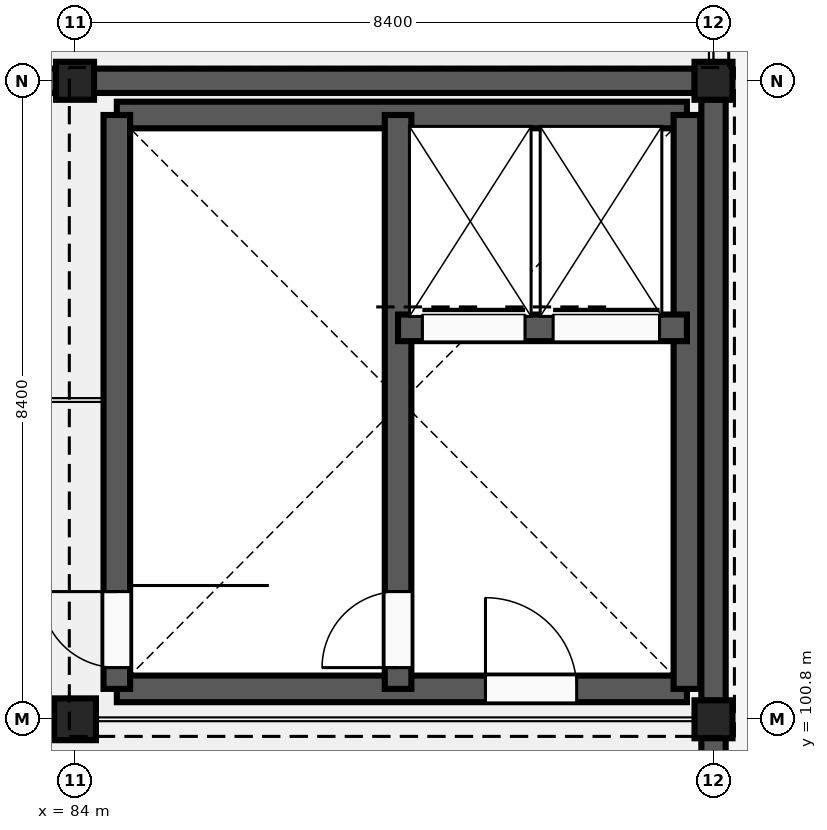
"""IFC4 building model, lengths in metres.
Left out: names, types, materials, properties, quantities, classifications, styles, units other than length and angle.
Written with IfcOpenShell. Run it as: python <this file> out.ifc"""

import sys

from ifc_helpers import new_model, si_unit, direction, frame, frame_2d, origin, origin_2d, place, context, subcontext, project, spatial, rectangle, extrude, element, fill, save


model = new_model("IFC4")
c1 = context("Model", 3, precision=1e-05, world=origin(), true_north=direction((0.0, 1.0)))
c2 = subcontext(c1, "Body", "Model", "MODEL_VIEW")
j1 = project(units=[si_unit("LENGTHUNIT", "METRE"), si_unit("PLANEANGLEUNIT", "RADIAN")], contexts=[c1])
p1 = place(None, origin())
s1 = spatial("IfcSite", under=j1, at=p1, CompositionType="ELEMENT")
p2 = place(p1, origin())
s2 = spatial("IfcBuilding", under=s1, at=p2, CompositionType="ELEMENT")
p3 = place(p2, frame((0.0, 0.0, 33.0)))
s3 = spatial("IfcBuildingStorey", under=s2, at=p3, CompositionType="ELEMENT", Elevation=33.0)
p4 = place(p3, frame((84.0, 100.8, 0.0), z_axis=(0.0, 0.0, 1.0), x_axis=(1.0, 0.0, 0.0)))
e1 = element("IfcColumn", 1, at=p4, inside=s3, PredefinedType="COLUMN", context=c2, shape_type="SweptSolid", body=[
    extrude(rectangle(XDim=0.55, YDim=0.55, at=origin_2d()), origin(), (0.0, 0.0, 1.0), 3.6),
])
for number, where, z_axis, x_axis in (
    (2, (84.0, 109.2, 0.0), (0.0, 0.0, 1.0), (1.0, 0.0, 0.0)),
    (3, (92.4, 100.8, 0.0), (0.0, 0.0, 1.0), (1.0, 0.0, 0.0)),
    (4, (92.4, 109.2, 0.0), (0.0, 0.0, 1.0), (1.0, 0.0, 0.0)),
):
    element("IfcColumn", number, at=place(p3, frame(where, z_axis=z_axis, x_axis=x_axis)), inside=s3, PredefinedType="COLUMN", context=c2, shape_type="SweptSolid", body=[
        extrude(rectangle(XDim=0.5, YDim=0.5, at=origin_2d()), origin(), (0.0, 0.0, 1.0), 3.6),
    ])
p5 = place(p3, frame((75.845, 109.2, 0.0), z_axis=(0.0, 0.0, 1.0), x_axis=(1.0, 0.0, 0.0)))
e5 = element("IfcWall", 5, at=p5, inside=s3, PredefinedType="SOLIDWALL", context=c2, shape_type="SweptSolid", body=[
    extrude(rectangle(XDim=7.91, YDim=0.32, at=frame_2d((3.955, 0.0))), origin(), (0.0, 0.0, 1.0), 2.9),
])
p6 = place(p5, frame((3.145, 0.0, 1.15)))
e6 = element("IfcOpeningElement", 6, at=p6, cuts=e5, PredefinedType="OPENING", context=c2, shape_type="SweptSolid", body=[
    extrude(rectangle(XDim=1.62, YDim=0.95, at=frame_2d((0.81, 0.475))), frame((0.0, 0.17, 0.0), z_axis=(0.0, -1.0, 0.0), x_axis=(1.0, 0.0, 0.0)), (0.0, 0.0, 1.0), 0.34),
])
p7 = place(p3, frame((92.4, 100.555, 0.0), z_axis=(0.0, 0.0, 1.0), x_axis=(0.0, -1.0, 0.0)))
e7 = element("IfcWall", 7, at=p7, inside=s3, PredefinedType="SOLIDWALL", context=c2, shape_type="SweptSolid", body=[
    extrude(rectangle(XDim=7.91, YDim=0.32, at=frame_2d((3.955, 0.0))), origin(), (0.0, 0.0, 1.0), 2.9),
])
p8 = place(p7, frame((2.055, 0.0, 0.0)))
e8 = element("IfcOpeningElement", 8, at=p8, cuts=e7, PredefinedType="OPENING", context=c2, shape_type="SweptSolid", body=[
    extrude(rectangle(XDim=1.8, YDim=2.25, at=frame_2d((0.9, 1.125))), frame((0.0, 0.17, 0.0), z_axis=(0.0, -1.0, 0.0), x_axis=(1.0, 0.0, 0.0)), (0.0, 0.0, 1.0), 0.34),
])
p9 = place(p3, frame((84.245, 109.2, 0.0), z_axis=(0.0, 0.0, 1.0), x_axis=(1.0, 0.0, 0.0)))
e9 = element("IfcWall", 9, at=p9, inside=s3, PredefinedType="SOLIDWALL", context=c2, shape_type="SweptSolid", body=[
    extrude(rectangle(XDim=7.91, YDim=0.32, at=frame_2d((3.955, 0.0))), origin(), (0.0, 0.0, 1.0), 2.9),
])
p10 = place(p3, frame((92.4, 108.955, 0.0), z_axis=(0.0, 0.0, 1.0), x_axis=(0.0, -1.0, 0.0)))
e10 = element("IfcWall", 10, at=p10, inside=s3, PredefinedType="SOLIDWALL", context=c2, shape_type="SweptSolid", body=[
    extrude(rectangle(XDim=7.91, YDim=0.32, at=frame_2d((3.955, 0.0))), origin(), (0.0, 0.0, 1.0), 2.9),
])
p11 = place(p3, frame((84.55, 101.2, 0.0), z_axis=(0.0, 0.0, 1.0), x_axis=(1.0, 0.0, 0.0)))
e11 = element("IfcWall", 11, at=p11, inside=s3, PredefinedType="SHEAR", context=c2, shape_type="SweptSolid", body=[
    extrude(rectangle(XDim=7.5, YDim=0.35, at=frame_2d((3.75, 0.0))), origin(), (0.0, 0.0, 1.0), 3.38),
])
p12 = place(p11, frame((4.85, 0.0, 0.0)))
e12 = element("IfcOpeningElement", 12, at=p12, cuts=e11, PredefinedType="OPENING", context=c2, shape_type="SweptSolid", body=[
    extrude(rectangle(XDim=1.2, YDim=2.2, at=frame_2d((0.6, 1.1))), frame((0.0, 0.185, 0.0), z_axis=(0.0, -1.0, 0.0), x_axis=(1.0, 0.0, 0.0)), (0.0, 0.0, 1.0), 0.37),
])
p13 = place(p3, frame((84.55, 108.75, 0.0), z_axis=(0.0, 0.0, 1.0), x_axis=(1.0, 0.0, 0.0)))
e13 = element("IfcWall", 13, at=p13, inside=s3, PredefinedType="SHEAR", context=c2, shape_type="SweptSolid", body=[
    extrude(rectangle(XDim=7.5, YDim=0.35, at=frame_2d((3.75, 0.0))), origin(), (0.0, 0.0, 1.0), 3.38),
])
p14 = place(p3, frame((84.55, 101.2, 0.0), z_axis=(0.0, 0.0, 1.0), x_axis=(0.0, 1.0, 0.0)))
e14 = element("IfcWall", 14, at=p14, inside=s3, PredefinedType="SHEAR", context=c2, shape_type="SweptSolid", body=[
    extrude(rectangle(XDim=7.55, YDim=0.35, at=frame_2d((3.775, 0.0))), origin(), (0.0, 0.0, 1.0), 3.38),
])
p15 = place(p14, frame((0.28, 0.0, 0.0)))
e15 = element("IfcOpeningElement", 15, at=p15, cuts=e14, PredefinedType="OPENING", context=c2, shape_type="SweptSolid", body=[
    extrude(rectangle(XDim=1.0, YDim=2.15, at=frame_2d((0.5, 1.075))), frame((0.0, 0.185, 0.0), z_axis=(0.0, -1.0, 0.0), x_axis=(1.0, 0.0, 0.0)), (0.0, 0.0, 1.0), 0.37),
])
p16 = place(p3, frame((92.05, 101.2, 0.0), z_axis=(0.0, 0.0, 1.0), x_axis=(0.0, 1.0, 0.0)))
e16 = element("IfcWall", 16, at=p16, inside=s3, PredefinedType="SHEAR", context=c2, shape_type="SweptSolid", body=[
    extrude(rectangle(XDim=7.55, YDim=0.35, at=frame_2d((3.775, 0.0))), origin(), (0.0, 0.0, 1.0), 3.38),
])
p17 = place(p3, frame((88.25, 101.2, 0.0), z_axis=(0.0, 0.0, 1.0), x_axis=(0.0, 1.0, 0.0)))
e17 = element("IfcWall", 17, at=p17, inside=s3, PredefinedType="SHEAR", context=c2, shape_type="SweptSolid", body=[
    extrude(rectangle(XDim=7.55, YDim=0.35, at=frame_2d((3.775, 0.0))), origin(), (0.0, 0.0, 1.0), 3.38),
])
p18 = place(p17, frame((0.28, 0.0, 0.0)))
e18 = element("IfcOpeningElement", 18, at=p18, cuts=e17, PredefinedType="OPENING", context=c2, shape_type="SweptSolid", body=[
    extrude(rectangle(XDim=1.0, YDim=2.15, at=frame_2d((0.5, 1.075))), frame((0.0, 0.185, 0.0), z_axis=(0.0, -1.0, 0.0), x_axis=(1.0, 0.0, 0.0)), (0.0, 0.0, 1.0), 0.37),
])
p19 = place(p3, frame((88.25, 105.95, 0.0), z_axis=(0.0, 0.0, 1.0), x_axis=(1.0, 0.0, 0.0)))
e19 = element("IfcWall", 19, at=p19, inside=s3, PredefinedType="SHEAR", context=c2, shape_type="SweptSolid", body=[
    extrude(rectangle(XDim=3.8, YDim=0.35, at=frame_2d((1.9, 0.0))), origin(), (0.0, 0.0, 1.0), 3.38),
])
p20 = place(p19, frame((0.32, 0.0, 0.0)))
e20 = element("IfcOpeningElement", 20, at=p20, cuts=e19, PredefinedType="OPENING", context=c2, shape_type="SweptSolid", body=[
    extrude(rectangle(XDim=1.35, YDim=2.25, at=frame_2d((0.675, 1.125))), frame((0.0, 0.185, 0.0), z_axis=(0.0, -1.0, 0.0), x_axis=(1.0, 0.0, 0.0)), (0.0, 0.0, 1.0), 0.37),
])
p21 = place(p19, frame((2.04, 0.0, 0.0)))
e21 = element("IfcOpeningElement", 21, at=p21, cuts=e19, PredefinedType="OPENING", context=c2, shape_type="SweptSolid", body=[
    extrude(rectangle(XDim=1.4, YDim=2.25, at=frame_2d((0.7, 1.125))), frame((0.0, 0.185, 0.0), z_axis=(0.0, -1.0, 0.0), x_axis=(1.0, 0.0, 0.0)), (0.0, 0.0, 1.0), 0.37),
])
p22 = place(p12, origin())
e22 = element("IfcDoor", 22, at=p22, inside=s3, OperationType="SINGLE_SWING_LEFT", PredefinedType="DOOR", context=c2, shape_type="SweptSolid", body=[
    extrude(rectangle(XDim=1.2, YDim=2.2, at=frame_2d((0.6, 1.1))), frame((0.0, 0.025, 0.0), z_axis=(0.0, -1.0, 0.0), x_axis=(1.0, 0.0, 0.0)), (0.0, 0.0, 1.0), 0.05),
])
fill(e12, e22)
p23 = place(p15, origin())
e23 = element("IfcDoor", 23, at=p23, inside=s3, OperationType="SINGLE_SWING_RIGHT", PredefinedType="DOOR", context=c2, shape_type="SweptSolid", body=[
    extrude(rectangle(XDim=1.0, YDim=2.15, at=frame_2d((0.5, 1.075))), frame((0.0, 0.025, 0.0), z_axis=(0.0, -1.0, 0.0), x_axis=(1.0, 0.0, 0.0)), (0.0, 0.0, 1.0), 0.05),
])
fill(e15, e23)
p24 = place(p18, origin())
e24 = element("IfcDoor", 24, at=p24, inside=s3, OperationType="SINGLE_SWING_LEFT", PredefinedType="DOOR", context=c2, shape_type="SweptSolid", body=[
    extrude(rectangle(XDim=1.0, YDim=2.15, at=frame_2d((0.5, 1.075))), frame((0.0, 0.025, 0.0), z_axis=(0.0, -1.0, 0.0), x_axis=(1.0, 0.0, 0.0)), (0.0, 0.0, 1.0), 0.05),
])
fill(e18, e24)
p25 = place(p20, origin())
e25 = element("IfcDoor", 25, at=p25, inside=s3, OperationType="SLIDING_TO_LEFT", PredefinedType="DOOR", context=c2, shape_type="SweptSolid", body=[
    extrude(rectangle(XDim=1.35, YDim=2.25, at=frame_2d((0.675, 1.125))), frame((0.0, 0.025, 0.0), z_axis=(0.0, -1.0, 0.0), x_axis=(1.0, 0.0, 0.0)), (0.0, 0.0, 1.0), 0.05),
])
fill(e20, e25)
p26 = place(p21, origin())
e26 = element("IfcDoor", 26, at=p26, inside=s3, OperationType="SLIDING_TO_LEFT", PredefinedType="DOOR", context=c2, shape_type="SweptSolid", body=[
    extrude(rectangle(XDim=1.4, YDim=2.25, at=frame_2d((0.7, 1.125))), frame((0.0, 0.025, 0.0), z_axis=(0.0, -1.0, 0.0), x_axis=(1.0, 0.0, 0.0)), (0.0, 0.0, 1.0), 0.05),
])
fill(e21, e26)
save(model, sys.argv[1])
